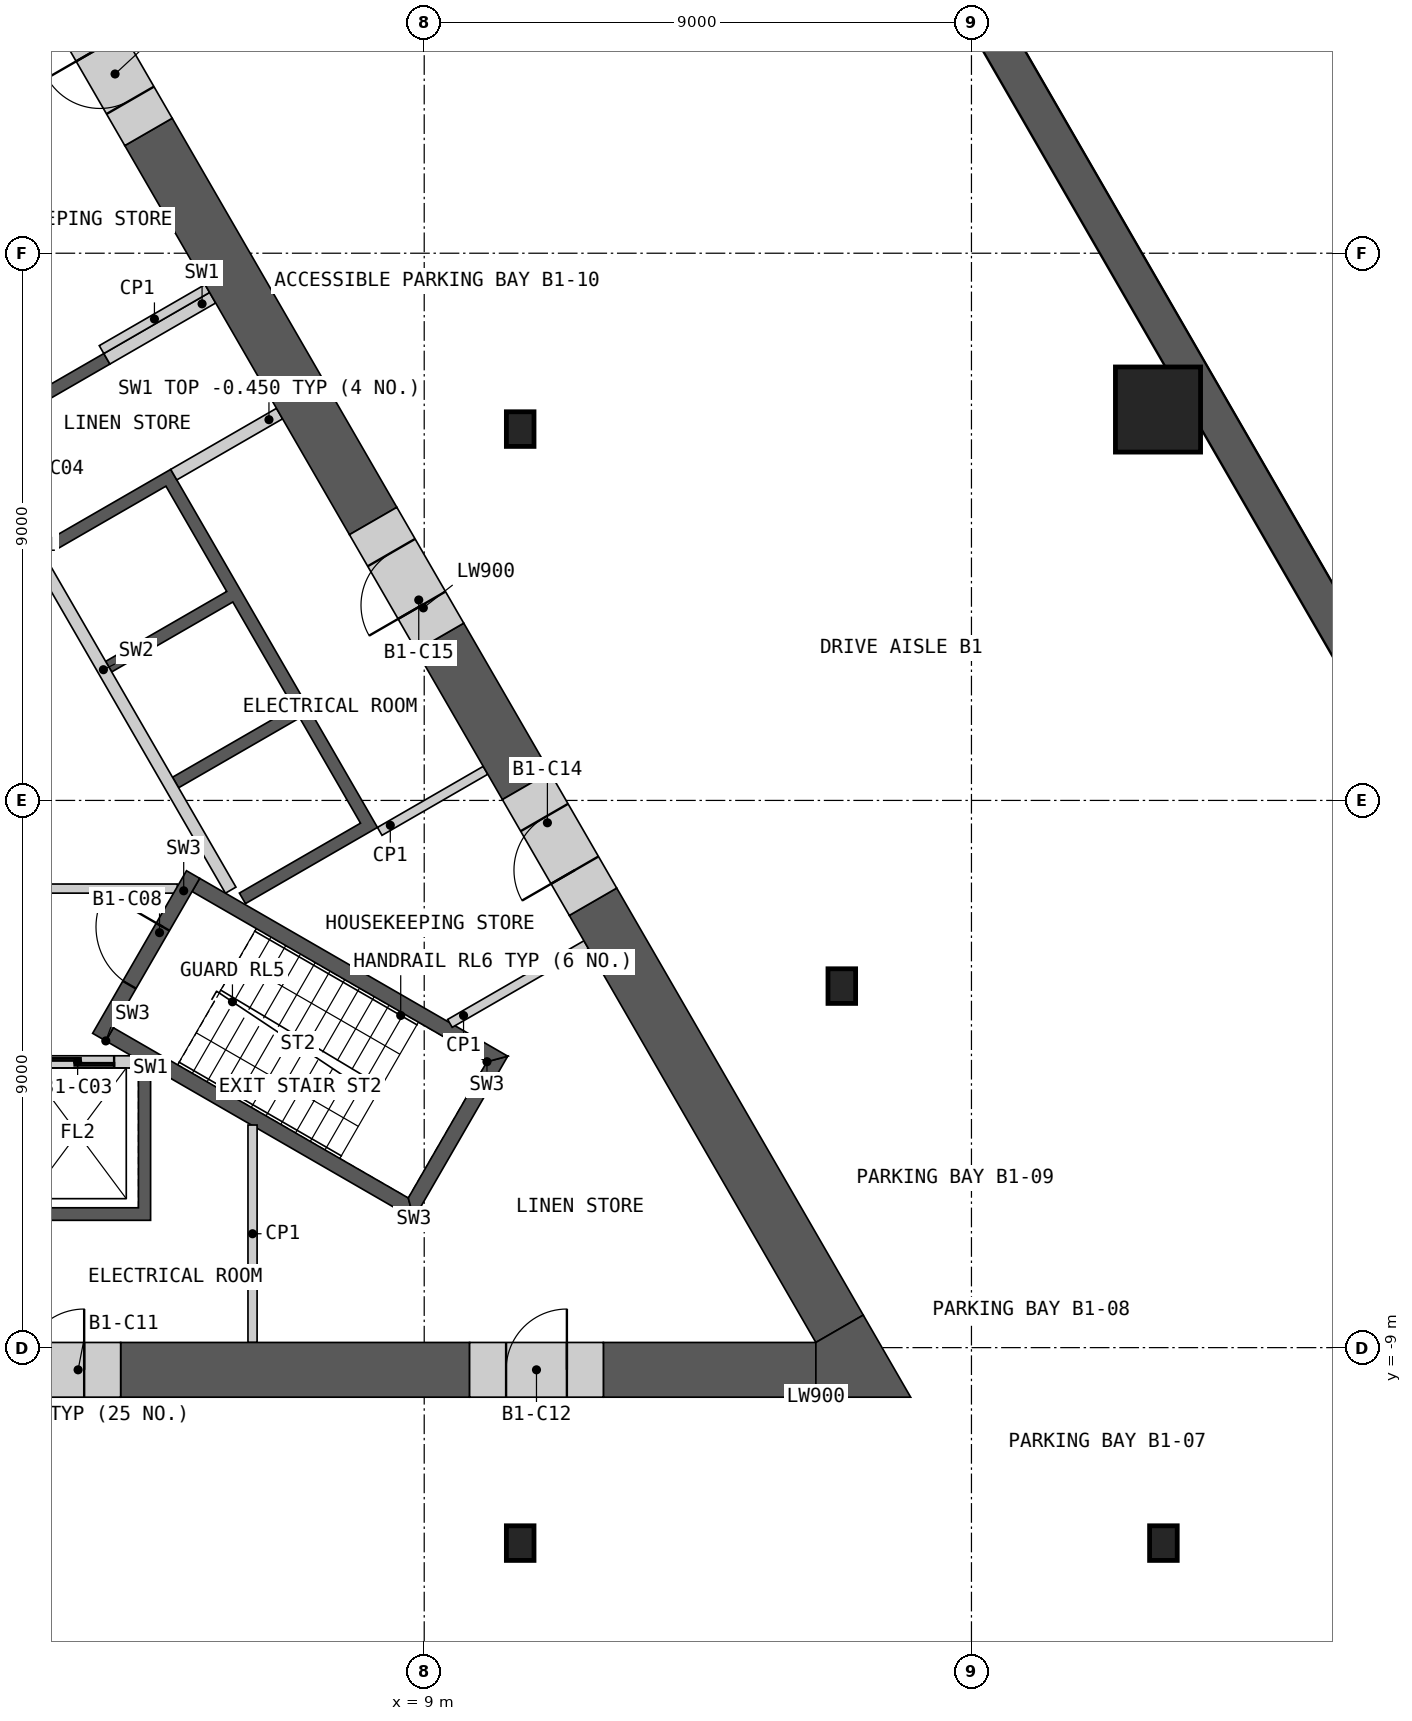
"""IFC4 building model, lengths in metres.
Left out: names, types, materials, properties, quantities, classifications, styles, units other than length and angle.
Written with IfcOpenShell. Run it as: python <this file> out.ifc"""

import sys

from ifc_helpers import new_model, si_unit, direction, frame, frame_2d, origin, origin_2d, place, context, subcontext, project, spatial, polyline, rectangle, hollow_rectangle, i_section, outline, extrude, element, fill, save


model = new_model("IFC4")
c1 = context("Model", 3, precision=1e-05, world=origin(), true_north=direction((0.0, 1.0)))
c2 = subcontext(c1, "Body", "Model", "MODEL_VIEW")
j1 = project(units=[si_unit("LENGTHUNIT", "METRE"), si_unit("PLANEANGLEUNIT", "RADIAN")], contexts=[c1])
p1 = place(None, origin())
s1 = spatial("IfcSite", under=j1, at=p1, CompositionType="ELEMENT")
p2 = place(p1, origin())
s2 = spatial("IfcBuilding", under=s1, at=p2, CompositionType="ELEMENT")
p3 = place(p2, frame((0.0, 0.0, -4.2)))
s3 = spatial("IfcBuildingStorey", under=s2, at=p3, CompositionType="ELEMENT", Elevation=-4.2)
p4 = place(p3, frame((31.74, -10.542, 0.0), z_axis=(0.0, 0.0, 1.0), x_axis=(-0.500000005698, 0.866025400495, 0.0)))
e1 = element("IfcWall", 1, at=p4, inside=s3, PredefinedType="SOLIDWALL", context=c2, shape_type="SweptSolid", body=[
    extrude(rectangle(XDim=50.0, YDim=0.6, at=frame_2d((25.0, 0.0))), origin(), (0.0, 0.0, 1.0), 3.75),
])
p5 = place(p3, frame((21.068, 6.429, 0.0), z_axis=(0.0, 0.0, 1.0), x_axis=(1.0, 0.0, 0.0)))
e2 = element("IfcColumn", 2, at=p5, inside=s3, PredefinedType="COLUMN", context=c2, shape_type="SweptSolid", body=[
    extrude(hollow_rectangle(XDim=1.4, YDim=1.4, WallThickness=0.1, at=origin_2d()), origin(), (0.0, 0.0, 1.0), 4.2),
])
for number, where, z_axis, x_axis in (
    (3, (10.578, -12.215, 0.0), (0.0, 0.0, 1.0), (1.0, 0.0, 0.0)),
    (4, (21.157, -12.215, 0.0), (0.0, 0.0, 1.0), (1.0, 0.0, 0.0)),
    (5, (15.868, -3.054, 0.0), (0.0, 0.0, 1.0), (1.0, 0.0, 0.0)),
    (6, (10.578, 6.107, 0.0), (0.0, 0.0, 1.0), (1.0, 0.0, 0.0)),
):
    element("IfcColumn", number, at=place(p3, frame(where, z_axis=z_axis, x_axis=x_axis)), inside=s3, PredefinedType="COLUMN", context=c2, shape_type="SweptSolid", body=[
        extrude(i_section(OverallWidth=0.454, OverallDepth=0.57, WebThickness=0.078, FlangeThickness=0.125, at=origin_2d()), origin(), (0.0, 0.0, 1.0), 4.2),
    ])
p6 = place(p3, origin())
e7 = element("IfcWall", 7, at=p6, inside=s3, PredefinedType="SHEAR", context=c2, shape_type="SweptSolid", body=[
    extrude(outline(polyline([(4.5, -4.4), (4.5, -6.906), (-4.5, -6.906), (-4.5, -4.4), (-4.3, -4.4), (-4.3, -6.7), (-2.3, -6.7), (-2.3, -4.4), (-2.1, -4.4), (-2.1, -6.7), (-0.1, -6.7), (-0.1, -4.4), (0.1, -4.4), (0.1, -6.7), (2.1, -6.7), (2.1, -4.4), (2.3, -4.4), (2.3, -6.7), (4.3, -6.7), (4.3, -4.4), (4.5, -4.4)])), origin(), (0.0, 0.0, 1.0), 3.75),
])
p7 = place(p3, frame((-4.187, -4.3, 0.0), z_axis=(0.0, 0.0, 1.0), x_axis=(1.0, 0.0, 0.0)))
e8 = element("IfcWall", 8, at=p7, inside=s3, PredefinedType="SOLIDWALL", context=c2, shape_type="SweptSolid", body=[
    extrude(rectangle(XDim=8.373, YDim=0.2, at=frame_2d((4.187, 0.0))), origin(), (0.0, 0.0, 1.0), 3.75),
])
p8 = place(p7, frame((0.287, 0.0, 0.0)))
e9 = element("IfcOpeningElement", 9, at=p8, cuts=e8, PredefinedType="OPENING", context=c2, shape_type="SweptSolid", body=[
    extrude(rectangle(XDim=1.2, YDim=2.1, at=frame_2d((0.6, 1.05))), frame((0.0, 0.11, 0.0), z_axis=(0.0, -1.0, 0.0), x_axis=(1.0, 0.0, 0.0)), (0.0, 0.0, 1.0), 0.22),
])
p9 = place(p7, frame((2.387, 0.0, 0.0)))
e10 = element("IfcOpeningElement", 10, at=p9, cuts=e8, PredefinedType="OPENING", context=c2, shape_type="SweptSolid", body=[
    extrude(rectangle(XDim=1.4, YDim=2.1, at=frame_2d((0.7, 1.05))), frame((0.0, 0.11, 0.0), z_axis=(0.0, -1.0, 0.0), x_axis=(1.0, 0.0, 0.0)), (0.0, 0.0, 1.0), 0.22),
])
p10 = place(p7, frame((6.887, 0.0, 0.0)))
e11 = element("IfcOpeningElement", 11, at=p10, cuts=e8, PredefinedType="OPENING", context=c2, shape_type="SweptSolid", body=[
    extrude(rectangle(XDim=1.2, YDim=2.1, at=frame_2d((0.6, 1.05))), frame((0.0, 0.11, 0.0), z_axis=(0.0, -1.0, 0.0), x_axis=(1.0, 0.0, 0.0)), (0.0, 0.0, 1.0), 0.22),
])
p11 = place(p3, origin())
e12 = element("IfcWall", 12, at=p11, inside=s3, PredefinedType="SHEAR", context=c2, shape_type="SweptSolid", body=[
    extrude(outline(polyline([(1.561, 6.097), (3.731, 7.35), (3.831, 7.177), (1.66, 5.924), (1.561, 6.097)])), origin(), (0.0, 0.0, 1.0), 3.75),
])
p12 = place(p3, origin())
e13 = element("IfcWall", 13, at=p12, inside=s3, PredefinedType="SHEAR", context=c2, shape_type="SweptSolid", body=[
    extrude(outline(polyline([(2.66, 4.192), (4.831, 5.445), (8.231, -0.444), (6.061, -1.697), (5.96, -1.524), (7.952, -0.374), (6.952, 1.358), (4.96, 0.208), (4.861, 0.381), (6.852, 1.531), (5.852, 3.263), (3.861, 2.113), (3.76, 2.287), (5.752, 3.437), (4.752, 5.169), (2.76, 4.019), (2.66, 4.192)])), origin(), (0.0, 0.0, 1.0), 3.75),
])
p13 = place(p3, frame((5.817, -1.476, 0.0), z_axis=(0.0, 0.0, 1.0), x_axis=(-0.500002616675, 0.866023893041, 0.0)))
e14 = element("IfcWall", 14, at=p13, inside=s3, PredefinedType="SOLIDWALL", context=c2, shape_type="SweptSolid", body=[
    extrude(rectangle(XDim=8.373, YDim=0.2, at=frame_2d((4.187, 0.0))), origin(), (0.0, 0.0, 1.0), 3.75),
])
p14 = place(p13, frame((7.037, 0.0, 0.0)))
e15 = element("IfcOpeningElement", 15, at=p14, cuts=e14, PredefinedType="OPENING", context=c2, shape_type="SweptSolid", body=[
    extrude(rectangle(XDim=0.9, YDim=2.1, at=frame_2d((0.45, 1.05))), frame((0.0, 0.11, 0.0), z_axis=(0.0, -1.0, 0.0), x_axis=(1.0, 0.0, 0.0)), (0.0, 0.0, 1.0), 0.22),
])
p15 = place(p3, frame((4.881, 5.358, 0.0), z_axis=(0.0, 0.0, 1.0), x_axis=(0.866035824272, 0.499981950752, 0.0)))
e16 = element("IfcWall", 16, at=p15, inside=s3, PredefinedType="SHEAR", context=c2, shape_type="SweptSolid", body=[
    extrude(rectangle(XDim=2.009, YDim=0.2, at=frame_2d((1.004, 0.0))), origin(), (0.0, 0.0, 1.0), 3.75),
])
p16 = place(p3, frame((3.781, 7.263, 0.0), z_axis=(0.0, 0.0, 1.0), x_axis=(0.865983199114, 0.50007309351, 0.0)))
e17 = element("IfcWall", 17, at=p16, inside=s3, PredefinedType="SHEAR", context=c2, shape_type="SweptSolid", body=[
    extrude(rectangle(XDim=2.009, YDim=0.2, at=frame_2d((1.004, 0.0))), origin(), (0.0, 0.0, 1.0), 3.75),
])
p17 = place(p3, frame((-4.941, -1.45, 0.0), z_axis=(0.0, 0.0, 1.0), x_axis=(1.0, 0.0, 0.0)))
e18 = element("IfcWall", 18, at=p17, inside=s3, PredefinedType="PARTITIONING", context=c2, shape_type="SweptSolid", body=[
    extrude(rectangle(XDim=9.882, YDim=0.15, at=frame_2d((4.941, 0.0))), origin(), (0.0, 0.0, 1.0), 3.75),
])
p18 = place(p17, frame((4.391, 0.0, 0.0)))
e19 = element("IfcOpeningElement", 19, at=p18, cuts=e18, PredefinedType="OPENING", context=c2, shape_type="SweptSolid", body=[
    extrude(rectangle(XDim=1.1, YDim=2.1, at=frame_2d((0.55, 1.05))), frame((0.0, 0.085, 0.0), z_axis=(0.0, -1.0, 0.0), x_axis=(1.0, 0.0, 0.0)), (0.0, 0.0, 1.0), 0.17),
])
p19 = place(p3, origin())
e20 = element("IfcWall", 20, at=p19, inside=s3, PredefinedType="SHEAR", context=c2, shape_type="SweptSolid", body=[
    extrude(outline(polyline([(3.763, -3.956), (8.83, -6.881), (8.738, -6.539), (3.888, -3.739), (3.763, -3.956)])), origin(), (0.0, 0.0, 1.0), 3.75),
])
p20 = place(p3, origin())
e21 = element("IfcWall", 21, at=p20, inside=s3, PredefinedType="SHEAR", context=c2, shape_type="SweptSolid", body=[
    extrude(outline(polyline([(8.83, -6.881), (10.374, -4.206), (10.032, -4.298), (8.738, -6.539), (8.83, -6.881)])), origin(), (0.0, 0.0, 1.0), 3.75),
])
p21 = place(p3, origin())
e22 = element("IfcWall", 22, at=p21, inside=s3, PredefinedType="SHEAR", context=c2, shape_type="SweptSolid", body=[
    extrude(outline(polyline([(10.032, -4.298), (10.374, -4.206), (5.307, -1.281), (5.182, -1.498), (10.032, -4.298)])), origin(), (0.0, 0.0, 1.0), 3.75),
])
p22 = place(p3, frame((3.655, -3.893, 0.0), z_axis=(0.0, 0.0, 1.0), x_axis=(0.499982516597, 0.866035497597, 0.0)))
e23 = element("IfcWall", 23, at=p22, inside=s3, PredefinedType="SHEAR", context=c2, shape_type="SweptSolid", body=[
    extrude(rectangle(XDim=3.088, YDim=0.25, at=frame_2d((1.544, 0.0))), origin(), (0.0, 0.0, 1.0), 3.75),
])
p23 = place(p22, frame((0.994, 0.0, 0.0)))
e24 = element("IfcOpeningElement", 24, at=p23, cuts=e23, PredefinedType="OPENING", context=c2, shape_type="SweptSolid", body=[
    extrude(rectangle(XDim=1.1, YDim=2.1, at=frame_2d((0.55, 1.05))), frame((0.0, 0.135, 0.0), z_axis=(0.0, -1.0, 0.0), x_axis=(1.0, 0.0, 0.0)), (0.0, 0.0, 1.0), 0.27),
])
for number, where, z_axis, x_axis in (
    (25, (3.693, 7.415, 0.0), (0.0, 0.0, 1.0), (0.866, 0.5, 0.0)),
    (26, (8.268, -0.509, 0.0), (0.0, 0.0, 1.0), (0.866, 0.5, 0.0)),
):
    element("IfcWall", number, at=place(p3, frame(where, z_axis=z_axis, x_axis=x_axis)), inside=s3, PredefinedType="PARTITIONING", context=c2, shape_type="SweptSolid", body=[
        extrude(rectangle(XDim=2.009, YDim=0.15, at=frame_2d((1.004, 0.0))), origin(), (0.0, 0.0, 1.0), 3.75),
    ])
p24 = place(p3, frame((6.177, -8.915, 0.0), z_axis=(0.0, 0.0, 1.0), x_axis=(0.0, 1.0, 0.0)))
e27 = element("IfcWall", 27, at=p24, inside=s3, PredefinedType="PARTITIONING", context=c2, shape_type="SweptSolid", body=[
    extrude(rectangle(XDim=3.576, YDim=0.15, at=frame_2d((1.788, 0.0))), origin(), (0.0, 0.0, 1.0), 3.75),
])
p25 = place(p3, frame((11.664, -2.373, 0.0), z_axis=(0.0, 0.0, 1.0), x_axis=(-0.866034804124, -0.499983717781, 0.0)))
e28 = element("IfcWall", 28, at=p25, inside=s3, PredefinedType="PARTITIONING", context=c2, shape_type="SweptSolid", body=[
    extrude(rectangle(XDim=2.588, YDim=0.15, at=frame_2d((1.294, 0.0))), origin(), (0.0, 0.0, 1.0), 3.75),
])
p26 = place(p3, frame((4.008, -9.365, 0.0), z_axis=(0.0, 0.0, 1.0), x_axis=(1.0, 0.0, 0.0)))
e29 = element("IfcWall", 29, at=p26, inside=s3, PredefinedType="SHEAR", context=c2, shape_type="SweptSolid", body=[
    extrude(rectangle(XDim=5.739, YDim=0.9, at=frame_2d((2.869, 0.0))), origin(), (0.0, 0.0, 1.0), 3.75),
])
p27 = place(p3, frame((11.946, -9.365, 0.0), z_axis=(0.0, 0.0, 1.0), x_axis=(1.0, 0.0, 0.0)))
e30 = element("IfcWall", 30, at=p27, inside=s3, PredefinedType="SHEAR", context=c2, shape_type="SweptSolid", body=[
    extrude(rectangle(XDim=3.495, YDim=0.9, at=frame_2d((1.748, 0.0))), origin(), (0.0, 0.0, 1.0), 3.75),
])
p28 = place(p3, frame((15.831, -8.69, 0.0), z_axis=(0.0, 0.0, 1.0), x_axis=(-0.499995201193, 0.866028174359, 0.0)))
e31 = element("IfcWall", 31, at=p28, inside=s3, PredefinedType="SHEAR", context=c2, shape_type="SweptSolid", body=[
    extrude(rectangle(XDim=8.11, YDim=0.9, at=frame_2d((4.055, 0.0))), origin(), (0.0, 0.0, 1.0), 3.75),
])
p29 = place(p3, frame((8.16, 4.596, 0.0), z_axis=(0.0, 0.0, 1.0), x_axis=(-0.500012259336, 0.866018325738, 0.0)))
e32 = element("IfcWall", 32, at=p29, inside=s3, PredefinedType="SHEAR", context=c2, shape_type="SweptSolid", body=[
    extrude(rectangle(XDim=7.389, YDim=0.9, at=frame_2d((3.695, 0.0))), origin(), (0.0, 0.0, 1.0), 3.75),
])
p30 = place(p3, frame((10.676, 0.239, 0.0), z_axis=(0.0, 0.0, 1.0), x_axis=(-0.499978737809, 0.866037679168, 0.0)))
e33 = element("IfcWall", 33, at=p30, inside=s3, PredefinedType="SHEAR", context=c2, shape_type="SweptSolid", body=[
    extrude(rectangle(XDim=2.831, YDim=0.9, at=frame_2d((1.416, 0.0))), origin(), (0.0, 0.0, 1.0), 3.75),
])
p31 = place(p3, origin())
e34 = element("IfcWall", 34, at=p31, inside=s3, PredefinedType="SHEAR", context=c2, shape_type="SweptSolid", body=[
    extrude(outline(polyline([(15.441, -9.815), (15.441, -8.915), (16.221, -8.465), (17.0, -9.815), (15.441, -9.815)])), origin(), (0.0, 0.0, 1.0), 3.75),
])
p32 = place(p3, frame((1.808, -9.365, 0.0), z_axis=(0.0, 0.0, 1.0), x_axis=(1.0, 0.0, 0.0)))
e35 = element("IfcWall", 35, at=p32, inside=s3, PredefinedType="SHEAR", context=c2, shape_type="SweptSolid", body=[
    extrude(rectangle(XDim=2.2, YDim=0.9, at=frame_2d((1.1, 0.0))), origin(), (0.0, 0.0, 1.0), 3.75),
])
p33 = place(p32, frame((0.6, 0.0, 0.0)))
e36 = element("IfcOpeningElement", 36, at=p33, cuts=e35, PredefinedType="OPENING", context=c2, shape_type="SweptSolid", body=[
    extrude(rectangle(XDim=1.0, YDim=2.1, at=frame_2d((0.5, 1.05))), frame((0.0, 0.46, 0.0), z_axis=(0.0, -1.0, 0.0), x_axis=(1.0, 0.0, 0.0)), (0.0, 0.0, 1.0), 0.92),
])
p34 = place(p3, frame((9.746, -9.365, 0.0), z_axis=(0.0, 0.0, 1.0), x_axis=(1.0, 0.0, 0.0)))
e37 = element("IfcWall", 37, at=p34, inside=s3, PredefinedType="SHEAR", context=c2, shape_type="SweptSolid", body=[
    extrude(rectangle(XDim=2.2, YDim=0.9, at=frame_2d((1.1, 0.0))), origin(), (0.0, 0.0, 1.0), 3.75),
])
p35 = place(p34, frame((0.6, 0.0, 0.0)))
e38 = element("IfcOpeningElement", 38, at=p35, cuts=e37, PredefinedType="OPENING", context=c2, shape_type="SweptSolid", body=[
    extrude(rectangle(XDim=1.0, YDim=2.1, at=frame_2d((0.5, 1.05))), frame((0.0, 0.46, 0.0), z_axis=(0.0, -1.0, 0.0), x_axis=(1.0, 0.0, 0.0)), (0.0, 0.0, 1.0), 0.92),
])
p36 = place(p3, frame((11.776, -1.667, 0.0), z_axis=(0.0, 0.0, 1.0), x_axis=(-0.50002983664, 0.866008176907, 0.0)))
e39 = element("IfcWall", 39, at=p36, inside=s3, PredefinedType="SHEAR", context=c2, shape_type="SweptSolid", body=[
    extrude(rectangle(XDim=2.2, YDim=0.9, at=frame_2d((1.1, 0.0))), origin(), (0.0, 0.0, 1.0), 3.75),
])
p37 = place(p36, frame((0.6, 0.0, 0.0)))
e40 = element("IfcOpeningElement", 40, at=p37, cuts=e39, PredefinedType="OPENING", context=c2, shape_type="SweptSolid", body=[
    extrude(rectangle(XDim=1.0, YDim=2.1, at=frame_2d((0.5, 1.05))), frame((0.0, 0.46, 0.0), z_axis=(0.0, -1.0, 0.0), x_axis=(1.0, 0.0, 0.0)), (0.0, 0.0, 1.0), 0.92),
])
p38 = place(p3, frame((9.26, 2.691, 0.0), z_axis=(0.0, 0.0, 1.0), x_axis=(-0.499946605688, 0.86605622881, 0.0)))
e41 = element("IfcWall", 41, at=p38, inside=s3, PredefinedType="SHEAR", context=c2, shape_type="SweptSolid", body=[
    extrude(rectangle(XDim=2.2, YDim=0.9, at=frame_2d((1.1, 0.0))), origin(), (0.0, 0.0, 1.0), 3.75),
])
p39 = place(p38, frame((0.6, 0.0, 0.0)))
e42 = element("IfcOpeningElement", 42, at=p39, cuts=e41, PredefinedType="OPENING", context=c2, shape_type="SweptSolid", body=[
    extrude(rectangle(XDim=1.0, YDim=2.1, at=frame_2d((0.5, 1.05))), frame((0.0, 0.46, 0.0), z_axis=(0.0, -1.0, 0.0), x_axis=(1.0, 0.0, 0.0)), (0.0, 0.0, 1.0), 0.92),
])
p40 = place(p3, frame((4.466, 10.995, 0.0), z_axis=(0.0, 0.0, 1.0), x_axis=(-0.500077893725, 0.86598042715, 0.0)))
e43 = element("IfcWall", 43, at=p40, inside=s3, PredefinedType="SHEAR", context=c2, shape_type="SweptSolid", body=[
    extrude(rectangle(XDim=2.2, YDim=0.9, at=frame_2d((1.1, 0.0))), origin(), (0.0, 0.0, 1.0), 3.75),
])
p41 = place(p40, frame((0.6, 0.0, 0.0)))
e44 = element("IfcOpeningElement", 44, at=p41, cuts=e43, PredefinedType="OPENING", context=c2, shape_type="SweptSolid", body=[
    extrude(rectangle(XDim=1.0, YDim=2.1, at=frame_2d((0.5, 1.05))), frame((0.0, 0.46, 0.0), z_axis=(0.0, -1.0, 0.0), x_axis=(1.0, 0.0, 0.0)), (0.0, 0.0, 1.0), 0.92),
])
p42 = place(p10, origin())
e45 = element("IfcDoor", 45, at=p42, inside=s3, OperationType="SLIDING_TO_LEFT", PredefinedType="DOOR", context=c2, shape_type="SweptSolid", body=[
    extrude(rectangle(XDim=1.2, YDim=2.1, at=frame_2d((0.6, 1.05))), frame((0.0, 0.025, 0.0), z_axis=(0.0, -1.0, 0.0), x_axis=(1.0, 0.0, 0.0)), (0.0, 0.0, 1.0), 0.05),
])
fill(e11, e45)
p43 = place(p23, origin())
e46 = element("IfcDoor", 46, at=p43, inside=s3, OperationType="SINGLE_SWING_RIGHT", PredefinedType="DOOR", context=c2, shape_type="SweptSolid", body=[
    extrude(rectangle(XDim=1.1, YDim=2.1, at=frame_2d((0.55, 1.05))), frame((0.0, 0.025, 0.0), z_axis=(0.0, -1.0, 0.0), x_axis=(1.0, 0.0, 0.0)), (0.0, 0.0, 1.0), 0.05),
])
fill(e24, e46)
p44 = place(p33, origin())
e47 = element("IfcDoor", 47, at=p44, inside=s3, OperationType="SINGLE_SWING_RIGHT", PredefinedType="DOOR", context=c2, shape_type="SweptSolid", body=[
    extrude(rectangle(XDim=1.0, YDim=2.1, at=frame_2d((0.5, 1.05))), frame((0.0, 0.205, 0.0), z_axis=(0.0, -1.0, 0.0), x_axis=(1.0, 0.0, 0.0)), (0.0, 0.0, 1.0), 0.05),
])
fill(e36, e47)
p45 = place(p35, origin())
e48 = element("IfcDoor", 48, at=p45, inside=s3, OperationType="SINGLE_SWING_RIGHT", PredefinedType="DOOR", context=c2, shape_type="SweptSolid", body=[
    extrude(rectangle(XDim=1.0, YDim=2.1, at=frame_2d((0.5, 1.05))), frame((0.0, 0.205, 0.0), z_axis=(0.0, -1.0, 0.0), x_axis=(1.0, 0.0, 0.0)), (0.0, 0.0, 1.0), 0.05),
])
fill(e38, e48)
p46 = place(p37, origin())
e49 = element("IfcDoor", 49, at=p46, inside=s3, OperationType="SINGLE_SWING_LEFT", PredefinedType="DOOR", context=c2, shape_type="SweptSolid", body=[
    extrude(rectangle(XDim=1.0, YDim=2.1, at=frame_2d((0.5, 1.05))), frame((0.0, 0.205, 0.0), z_axis=(0.0, -1.0, 0.0), x_axis=(1.0, 0.0, 0.0)), (0.0, 0.0, 1.0), 0.05),
])
fill(e40, e49)
p47 = place(p39, origin())
e50 = element("IfcDoor", 50, at=p47, inside=s3, OperationType="SINGLE_SWING_LEFT", PredefinedType="DOOR", context=c2, shape_type="SweptSolid", body=[
    extrude(rectangle(XDim=1.0, YDim=2.1, at=frame_2d((0.5, 1.05))), frame((0.0, 0.205, 0.0), z_axis=(0.0, -1.0, 0.0), x_axis=(1.0, 0.0, 0.0)), (0.0, 0.0, 1.0), 0.05),
])
fill(e42, e50)
p48 = place(p41, origin())
e51 = element("IfcDoor", 51, at=p48, inside=s3, OperationType="SINGLE_SWING_RIGHT", PredefinedType="DOOR", context=c2, shape_type="SweptSolid", body=[
    extrude(rectangle(XDim=1.0, YDim=2.1, at=frame_2d((0.5, 1.05))), frame((0.0, 0.205, 0.0), z_axis=(0.0, -1.0, 0.0), x_axis=(1.0, 0.0, 0.0)), (0.0, 0.0, 1.0), 0.05),
])
fill(e44, e51)
save(model, sys.argv[1])
